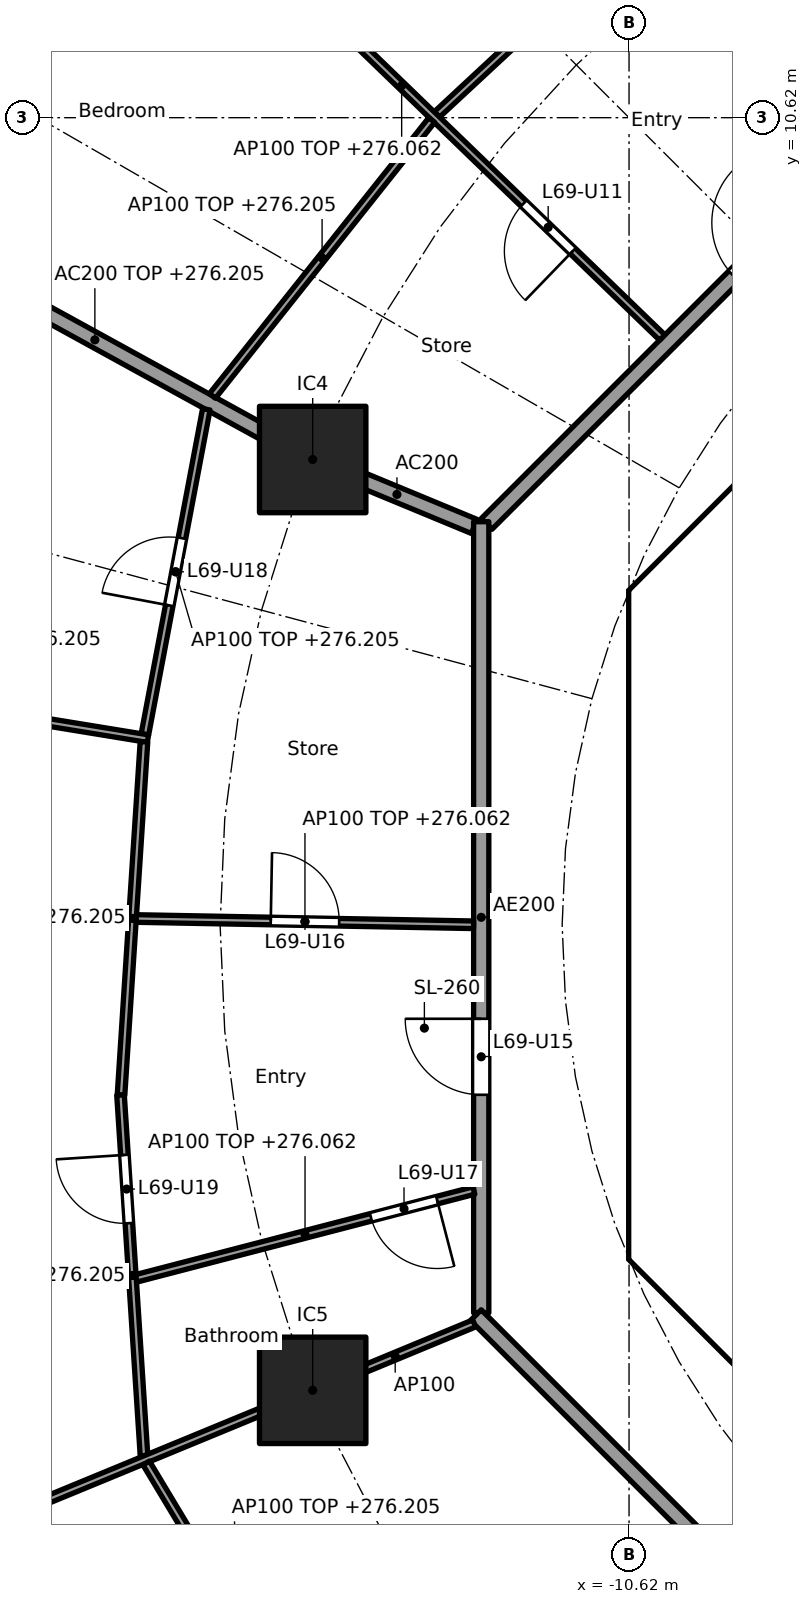
"""IFC4 building model, lengths in metres.
Left out: names, types, materials, properties, quantities, classifications, styles, units other than length and angle.
Written with IfcOpenShell. Run it as: python <this file> out.ifc"""

import sys

from ifc_helpers import new_model, si_unit, direction, frame, frame_2d, origin, origin_2d, place, context, subcontext, project, spatial, polyline, rectangle, outline, extrude, element, fill, save


model = new_model("IFC4")
c1 = context("Model", 3, precision=1e-05, world=origin(), true_north=direction((0.0, 1.0)))
c2 = subcontext(c1, "Body", "Model", "MODEL_VIEW")
j1 = project(units=[si_unit("LENGTHUNIT", "METRE"), si_unit("PLANEANGLEUNIT", "RADIAN")], contexts=[c1])
p1 = place(None, origin())
s1 = spatial("IfcSite", under=j1, at=p1, CompositionType="ELEMENT")
p2 = place(p1, origin())
s2 = spatial("IfcBuilding", under=s1, at=p2, CompositionType="ELEMENT")
p3 = place(p2, frame((0.0, 0.0, 273.3)))
s3 = spatial("IfcBuildingStorey", under=s2, at=p3, CompositionType="ELEMENT", Elevation=273.3)
for number, where, z_axis, x_axis in (
    (1, (-14.782, 6.123, 0.0), (0.0, 0.0, 1.0), (1.0, 0.0, 0.0)),
    (2, (-14.782, -6.123, 0.0), (0.0, 0.0, 1.0), (1.0, 0.0, 0.0)),
):
    element("IfcColumn", number, at=place(p3, frame(where, z_axis=z_axis, x_axis=x_axis)), inside=s3, PredefinedType="COLUMN", context=c2, shape_type="SweptSolid", body=[
        extrude(rectangle(XDim=1.4, YDim=1.4, at=origin_2d()), origin(), (0.0, 0.0, 1.0), 3.7),
    ])
p4 = place(p3, frame((-4.613, 9.988, 0.0), z_axis=(0.0, 0.0, 1.0), x_axis=(-0.707106781187, -0.707106781187, 0.0)))
e3 = element("IfcWall", 3, at=p4, inside=s3, PredefinedType="SHEAR", context=c2, shape_type="SweptSolid", body=[
    extrude(rectangle(XDim=7.602, YDim=0.6, at=frame_2d((3.801, 0.0))), origin(), (0.0, 0.0, 1.0), 3.44),
])
p5 = place(p4, frame((0.351, 0.0, 0.0)))
e4 = element("IfcOpeningElement", 4, at=p5, cuts=e3, PredefinedType="OPENING", context=c2, shape_type="SweptSolid", body=[
    extrude(rectangle(XDim=1.1, YDim=2.1, at=frame_2d((0.55, 1.05))), frame((0.0, 0.31, 0.0), z_axis=(0.0, -1.0, 0.0), x_axis=(1.0, 0.0, 0.0)), (0.0, 0.0, 1.0), 0.62),
])
p6 = place(p3, frame((-10.325, 3.801, 0.0), z_axis=(0.0, 0.0, 1.0), x_axis=(0.0, -1.0, 0.0)))
e5 = element("IfcWall", 5, at=p6, inside=s3, PredefinedType="SHEAR", context=c2, shape_type="SweptSolid", body=[
    extrude(rectangle(XDim=7.602, YDim=0.6, at=frame_2d((3.801, 0.0))), origin(), (0.0, 0.0, 1.0), 3.44),
])
p7 = place(p6, frame((0.651, 0.0, 0.0)))
e6 = element("IfcOpeningElement", 6, at=p7, cuts=e5, PredefinedType="OPENING", context=c2, shape_type="SweptSolid", body=[
    extrude(rectangle(XDim=1.5, YDim=2.1, at=frame_2d((0.75, 1.05))), frame((0.0, 0.31, 0.0), z_axis=(0.0, -1.0, 0.0), x_axis=(1.0, 0.0, 0.0)), (0.0, 0.0, 1.0), 0.62),
])
p8 = place(p6, frame((5.451, 0.0, 0.0)))
e7 = element("IfcOpeningElement", 7, at=p8, cuts=e5, PredefinedType="OPENING", context=c2, shape_type="SweptSolid", body=[
    extrude(rectangle(XDim=1.5, YDim=2.1, at=frame_2d((0.75, 1.05))), frame((0.0, 0.31, 0.0), z_axis=(0.0, -1.0, 0.0), x_axis=(1.0, 0.0, 0.0)), (0.0, 0.0, 1.0), 0.62),
])
p9 = place(p3, frame((-9.988, -4.613, 0.0), z_axis=(0.0, 0.0, 1.0), x_axis=(0.707106781187, -0.707106781187, 0.0)))
e8 = element("IfcWall", 8, at=p9, inside=s3, PredefinedType="SHEAR", context=c2, shape_type="SweptSolid", body=[
    extrude(rectangle(XDim=7.602, YDim=0.6, at=frame_2d((3.801, 0.0))), origin(), (0.0, 0.0, 1.0), 3.44),
])
p10 = place(p9, frame((6.151, 0.0, 0.0)))
e9 = element("IfcOpeningElement", 9, at=p10, cuts=e8, PredefinedType="OPENING", context=c2, shape_type="SweptSolid", body=[
    extrude(rectangle(XDim=1.1, YDim=2.1, at=frame_2d((0.55, 1.05))), frame((0.0, 0.31, 0.0), z_axis=(0.0, -1.0, 0.0), x_axis=(1.0, 0.0, 0.0)), (0.0, 0.0, 1.0), 0.62),
])
p11 = place(p3, origin())
e10 = element("IfcWall", 10, at=p11, inside=s3, PredefinedType="SHEAR", context=c2, shape_type="SweptSolid", body=[
    extrude(outline(polyline([(-10.625, -3.801), (-10.025, -3.801), (-10.025, -4.152), (-9.776, -4.401), (-10.2, -4.825), (-10.625, -4.401), (-10.625, -3.801)])), origin(), (0.0, 0.0, 1.0), 3.44),
])
p12 = place(p3, origin())
e11 = element("IfcWall", 11, at=p12, inside=s3, PredefinedType="SHEAR", context=c2, shape_type="SweptSolid", body=[
    extrude(outline(polyline([(-10.2, 4.825), (-9.776, 4.401), (-10.025, 4.152), (-10.025, 3.801), (-10.625, 3.801), (-10.625, 4.401), (-10.2, 4.825)])), origin(), (0.0, 0.0, 1.0), 3.44),
])
for number, where, z_axis, x_axis in (
    (12, (-10.025, -4.0, 0.0), (0.0, 0.0, 1.0), (1.0, 0.0, 0.0)),
    (13, (-10.025, 4.0, 0.0), (0.0, 0.0, 1.0), (1.0, 0.0, 0.0)),
):
    element("IfcWall", number, at=place(p3, frame(where, z_axis=z_axis, x_axis=x_axis)), inside=s3, PredefinedType="PARTITIONING", context=c2, shape_type="SweptSolid", body=[
        extrude(rectangle(XDim=3.325, YDim=0.2, at=frame_2d((1.662, 0.0))), origin(), (0.0, 0.0, 1.0), 3.44),
    ])
p13 = place(p3, frame((-12.657, 5.243, 0.0), z_axis=(0.0, 0.0, 1.0), x_axis=(-0.923869415315, 0.382707856524, 0.0)))
e14 = element("IfcWall", 14, at=p13, inside=s3, PredefinedType="PARTITIONING", context=c2, shape_type="SweptSolid", body=[
    extrude(rectangle(XDim=2.2, YDim=0.2, at=frame_2d((1.1, 0.0))), origin(), (0.0, 0.0, 1.0), 3.44),
])
p14 = place(p3, frame((-14.826, 6.147, 0.0), z_axis=(0.0, 0.0, 1.0), x_axis=(-0.876484755865, 0.481429613481, 0.0)))
e15 = element("IfcWall", 15, at=p14, inside=s3, PredefinedType="PARTITIONING", context=c2, shape_type="SweptSolid", body=[
    extrude(rectangle(XDim=6.439, YDim=0.2, at=frame_2d((3.219, 0.0))), origin(), (0.0, 0.0, 1.0), 2.905),
])
p15 = place(p3, frame((-5.275, 12.494, 0.0), z_axis=(0.0, 0.0, 1.0), x_axis=(-0.707106781187, -0.707106781187, 0.0)))
e16 = element("IfcWall", 16, at=p15, inside=s3, PredefinedType="PARTITIONING", context=c2, shape_type="SweptSolid", body=[
    extrude(rectangle(XDim=10.209, YDim=0.2, at=frame_2d((5.104, 0.0))), origin(), (0.0, 0.0, 1.0), 3.44),
])
p16 = place(p15, frame((4.604, 0.0, 0.0)))
e17 = element("IfcOpeningElement", 17, at=p16, cuts=e16, PredefinedType="OPENING", context=c2, shape_type="SweptSolid", body=[
    extrude(rectangle(XDim=1.0, YDim=2.1, at=frame_2d((0.5, 1.05))), frame((0.0, 0.11, 0.0), z_axis=(0.0, -1.0, 0.0), x_axis=(1.0, 0.0, 0.0)), (0.0, 0.0, 1.0), 0.22),
])
p17 = place(p3, frame((-12.565, 5.304, 0.0), z_axis=(0.0, 0.0, 1.0), x_axis=(0.0, -1.0, 0.0)))
e18 = element("IfcWall", 18, at=p17, inside=s3, PredefinedType="PARTITIONING", context=c2, shape_type="SweptSolid", body=[
    extrude(rectangle(XDim=10.409, YDim=0.2, at=frame_2d((5.205, 0.0))), origin(), (0.0, 0.0, 1.0), 3.44),
])
p18 = place(p17, frame((6.539, 0.0, 0.0)))
e19 = element("IfcOpeningElement", 19, at=p18, cuts=e18, PredefinedType="OPENING", context=c2, shape_type="SweptSolid", body=[
    extrude(rectangle(XDim=1.0, YDim=2.1, at=frame_2d((0.5, 1.05))), frame((0.0, 0.11, 0.0), z_axis=(0.0, -1.0, 0.0), x_axis=(1.0, 0.0, 0.0)), (0.0, 0.0, 1.0), 0.22),
])
p19 = place(p3, frame((-12.635, -5.134, 0.0), z_axis=(0.0, 0.0, 1.0), x_axis=(0.707106781187, -0.707106781187, 0.0)))
e20 = element("IfcWall", 20, at=p19, inside=s3, PredefinedType="PARTITIONING", context=c2, shape_type="SweptSolid", body=[
    extrude(rectangle(XDim=10.609, YDim=0.2, at=frame_2d((5.305, 0.0))), origin(), (0.0, 0.0, 1.0), 3.44),
])
p20 = place(p3, frame((-7.709, 10.197, 0.0), z_axis=(0.0, 0.0, 1.0), x_axis=(-0.515516160663, 0.856879856278, 0.0)))
e21 = element("IfcWall", 21, at=p20, inside=s3, PredefinedType="PARTITIONING", context=c2, shape_type="SweptSolid", body=[
    extrude(rectangle(XDim=9.426, YDim=0.1, at=frame_2d((4.713, 0.0))), origin(), (0.0, 0.0, 1.0), 2.762),
])
p21 = place(p20, frame((1.615, 0.0, 0.0)))
e22 = element("IfcOpeningElement", 22, at=p21, cuts=e21, PredefinedType="OPENING", context=c2, shape_type="SweptSolid", body=[
    extrude(rectangle(XDim=0.9, YDim=2.1, at=frame_2d((0.45, 1.05))), frame((0.0, 0.06, 0.0), z_axis=(0.0, -1.0, 0.0), x_axis=(1.0, 0.0, 0.0)), (0.0, 0.0, 1.0), 0.12),
])
p22 = place(p20, frame((6.328, 0.0, 0.0)))
e23 = element("IfcOpeningElement", 23, at=p22, cuts=e21, PredefinedType="OPENING", context=c2, shape_type="SweptSolid", body=[
    extrude(rectangle(XDim=0.9, YDim=2.1, at=frame_2d((0.45, 1.05))), frame((0.0, 0.06, 0.0), z_axis=(0.0, -1.0, 0.0), x_axis=(1.0, 0.0, 0.0)), (0.0, 0.0, 1.0), 0.12),
])
p23 = place(p3, frame((-9.875, 13.702, 0.0), z_axis=(0.0, 0.0, 1.0), x_axis=(-0.732618266441, -0.680639754699, 0.0)))
e24 = element("IfcWall", 24, at=p23, inside=s3, PredefinedType="PARTITIONING", context=c2, shape_type="SweptSolid", body=[
    extrude(rectangle(XDim=4.467, YDim=0.1, at=frame_2d((2.233, 0.0))), origin(), (0.0, 0.0, 1.0), 2.905),
])
p24 = place(p23, frame((1.783, 0.0, 0.0)))
e25 = element("IfcOpeningElement", 25, at=p24, cuts=e24, PredefinedType="OPENING", context=c2, shape_type="SweptSolid", body=[
    extrude(rectangle(XDim=0.9, YDim=2.1, at=frame_2d((0.45, 1.05))), frame((0.0, 0.06, 0.0), z_axis=(0.0, -1.0, 0.0), x_axis=(1.0, 0.0, 0.0)), (0.0, 0.0, 1.0), 0.12),
])
p25 = place(p3, frame((-10.183, 7.727, 0.0), z_axis=(0.0, 0.0, 1.0), x_axis=(-0.719063433856, 0.694944442449, 0.0)))
e26 = element("IfcWall", 26, at=p25, inside=s3, PredefinedType="PARTITIONING", context=c2, shape_type="SweptSolid", body=[
    extrude(rectangle(XDim=9.535, YDim=0.1, at=frame_2d((4.768, 0.0))), origin(), (0.0, 0.0, 1.0), 2.762),
])
p26 = place(p25, frame((1.637, 0.0, 0.0)))
e27 = element("IfcOpeningElement", 27, at=p26, cuts=e26, PredefinedType="OPENING", context=c2, shape_type="SweptSolid", body=[
    extrude(rectangle(XDim=0.9, YDim=2.1, at=frame_2d((0.45, 1.05))), frame((0.0, 0.06, 0.0), z_axis=(0.0, -1.0, 0.0), x_axis=(1.0, 0.0, 0.0)), (0.0, 0.0, 1.0), 0.12),
])
p27 = place(p25, frame((6.405, 0.0, 0.0)))
e28 = element("IfcOpeningElement", 28, at=p27, cuts=e26, PredefinedType="OPENING", context=c2, shape_type="SweptSolid", body=[
    extrude(rectangle(XDim=0.9, YDim=2.1, at=frame_2d((0.45, 1.05))), frame((0.0, 0.06, 0.0), z_axis=(0.0, -1.0, 0.0), x_axis=(1.0, 0.0, 0.0)), (0.0, 0.0, 1.0), 0.12),
])
p28 = place(p3, frame((-13.216, 10.589, 0.0), z_axis=(0.0, 0.0, 1.0), x_axis=(-0.622251572882, -0.782817335045, 0.0)))
e29 = element("IfcWall", 29, at=p28, inside=s3, PredefinedType="PARTITIONING", context=c2, shape_type="SweptSolid", body=[
    extrude(rectangle(XDim=4.636, YDim=0.1, at=frame_2d((2.318, 0.0))), origin(), (0.0, 0.0, 1.0), 2.905),
])
p29 = place(p3, frame((-16.181, 6.783, 0.0), z_axis=(0.0, 0.0, 1.0), x_axis=(-0.185670583745, -0.982612046706, 0.0)))
e30 = element("IfcWall", 30, at=p29, inside=s3, PredefinedType="PARTITIONING", context=c2, shape_type="SweptSolid", body=[
    extrude(rectangle(XDim=4.351, YDim=0.1, at=frame_2d((2.176, 0.0))), origin(), (0.0, 0.0, 1.0), 2.905),
])
p30 = place(p29, frame((1.726, 0.0, 0.0)))
e31 = element("IfcOpeningElement", 31, at=p30, cuts=e30, PredefinedType="OPENING", context=c2, shape_type="SweptSolid", body=[
    extrude(rectangle(XDim=0.9, YDim=2.1, at=frame_2d((0.45, 1.05))), frame((0.0, 0.06, 0.0), z_axis=(0.0, -1.0, 0.0), x_axis=(1.0, 0.0, 0.0)), (0.0, 0.0, 1.0), 0.12),
])
p31 = place(p3, frame((-16.949, 2.451, 0.0), z_axis=(0.0, 0.0, 1.0), x_axis=(-0.986937570833, 0.161103169673, 0.0)))
e32 = element("IfcWall", 32, at=p31, inside=s3, PredefinedType="PARTITIONING", context=c2, shape_type="SweptSolid", body=[
    extrude(rectangle(XDim=5.743, YDim=0.1, at=frame_2d((2.872, 0.0))), origin(), (0.0, 0.0, 1.0), 2.905),
])
p32 = place(p3, frame((-17.002, 2.409, 0.0), z_axis=(0.0, 0.0, 1.0), x_axis=(-0.064855550758, -0.997894662545, 0.0)))
e33 = element("IfcWall", 33, at=p32, inside=s3, PredefinedType="PARTITIONING", context=c2, shape_type="SweptSolid", body=[
    extrude(rectangle(XDim=4.656, YDim=0.1, at=frame_2d((2.328, 0.0))), origin(), (0.0, 0.0, 1.0), 2.905),
])
p33 = place(p3, frame((-12.665, 0.002, 0.0), z_axis=(0.0, 0.0, 1.0), x_axis=(-0.999827178165, 0.018590691287, 0.0)))
e34 = element("IfcWall", 34, at=p33, inside=s3, PredefinedType="PARTITIONING", context=c2, shape_type="SweptSolid", body=[
    extrude(rectangle(XDim=4.439, YDim=0.1, at=frame_2d((2.219, 0.0))), origin(), (0.0, 0.0, 1.0), 2.762),
])
p34 = place(p33, frame((1.769, 0.0, 0.0)))
e35 = element("IfcOpeningElement", 35, at=p34, cuts=e34, PredefinedType="OPENING", context=c2, shape_type="SweptSolid", body=[
    extrude(rectangle(XDim=0.9, YDim=2.1, at=frame_2d((0.45, 1.05))), frame((0.0, 0.06, 0.0), z_axis=(0.0, -1.0, 0.0), x_axis=(1.0, 0.0, 0.0)), (0.0, 0.0, 1.0), 0.12),
])
p35 = place(p3, frame((-17.31, -2.238, 0.0), z_axis=(0.0, 0.0, 1.0), x_axis=(0.064949202176, -0.997888571503, 0.0)))
e36 = element("IfcWall", 36, at=p35, inside=s3, PredefinedType="PARTITIONING", context=c2, shape_type="SweptSolid", body=[
    extrude(rectangle(XDim=4.759, YDim=0.1, at=frame_2d((2.379, 0.0))), origin(), (0.0, 0.0, 1.0), 2.905),
])
p36 = place(p35, frame((0.79, 0.0, 0.0)))
e37 = element("IfcOpeningElement", 37, at=p36, cuts=e36, PredefinedType="OPENING", context=c2, shape_type="SweptSolid", body=[
    extrude(rectangle(XDim=0.9, YDim=2.1, at=frame_2d((0.45, 1.05))), frame((0.0, 0.06, 0.0), z_axis=(0.0, -1.0, 0.0), x_axis=(1.0, 0.0, 0.0)), (0.0, 0.0, 1.0), 0.12),
])
p37 = place(p3, frame((-12.662, -3.495, 0.0), z_axis=(0.0, 0.0, 1.0), x_axis=(-0.967834941053, -0.251586022817, 0.0)))
e38 = element("IfcWall", 38, at=p37, inside=s3, PredefinedType="PARTITIONING", context=c2, shape_type="SweptSolid", body=[
    extrude(rectangle(XDim=4.59, YDim=0.1, at=frame_2d((2.295, 0.0))), origin(), (0.0, 0.0, 1.0), 2.762),
])
p38 = place(p37, frame((0.5, 0.0, 0.0)))
e39 = element("IfcOpeningElement", 39, at=p38, cuts=e38, PredefinedType="OPENING", context=c2, shape_type="SweptSolid", body=[
    extrude(rectangle(XDim=0.9, YDim=2.1, at=frame_2d((0.45, 1.05))), frame((0.0, 0.06, 0.0), z_axis=(0.0, -1.0, 0.0), x_axis=(1.0, 0.0, 0.0)), (0.0, 0.0, 1.0), 0.12),
])
p39 = place(p3, frame((-12.657, -5.243, 0.0), z_axis=(0.0, 0.0, 1.0), x_axis=(-0.923871314276, -0.382703272338, 0.0)))
e40 = element("IfcWall", 40, at=p39, inside=s3, PredefinedType="PARTITIONING", context=c2, shape_type="SweptSolid", body=[
    extrude(rectangle(XDim=2.249, YDim=0.1, at=frame_2d((1.125, 0.0))), origin(), (0.0, 0.0, 1.0), 3.44),
])
p40 = place(p3, frame((-14.828, -6.142, 0.0), z_axis=(0.0, 0.0, 1.0), x_axis=(-0.924478087429, -0.381235184451, 0.0)))
e41 = element("IfcWall", 41, at=p40, inside=s3, PredefinedType="PARTITIONING", context=c2, shape_type="SweptSolid", body=[
    extrude(rectangle(XDim=8.499, YDim=0.1, at=frame_2d((4.25, 0.0))), origin(), (0.0, 0.0, 1.0), 2.905),
])
p41 = place(p40, frame((4.973, 0.0, 0.0)))
e42 = element("IfcOpeningElement", 42, at=p41, cuts=e41, PredefinedType="OPENING", context=c2, shape_type="SweptSolid", body=[
    extrude(rectangle(XDim=0.9, YDim=2.1, at=frame_2d((0.45, 1.05))), frame((0.0, 0.06, 0.0), z_axis=(0.0, -1.0, 0.0), x_axis=(1.0, 0.0, 0.0)), (0.0, 0.0, 1.0), 0.12),
])
p42 = place(p3, frame((-16.972, -7.08, 0.0), z_axis=(0.0, 0.0, 1.0), x_axis=(0.514989049311, -0.857196756346, 0.0)))
e43 = element("IfcWall", 43, at=p42, inside=s3, PredefinedType="PARTITIONING", context=c2, shape_type="SweptSolid", body=[
    extrude(rectangle(XDim=4.512, YDim=0.1, at=frame_2d((2.256, 0.0))), origin(), (0.0, 0.0, 1.0), 2.905),
])
p43 = place(p42, frame((1.806, 0.0, 0.0)))
e44 = element("IfcOpeningElement", 44, at=p43, cuts=e43, PredefinedType="OPENING", context=c2, shape_type="SweptSolid", body=[
    extrude(rectangle(XDim=0.9, YDim=2.1, at=frame_2d((0.45, 1.05))), frame((0.0, 0.06, 0.0), z_axis=(0.0, -1.0, 0.0), x_axis=(1.0, 0.0, 0.0)), (0.0, 0.0, 1.0), 0.12),
])
p44 = place(p7, origin())
e45 = element("IfcDoor", 45, at=p44, inside=s3, OperationType="DOUBLE_DOOR_SINGLE_SWING", PredefinedType="DOOR", context=c2, shape_type="SweptSolid", body=[
    extrude(rectangle(XDim=1.5, YDim=2.1, at=frame_2d((0.75, 1.05))), frame((0.0, 0.025, 0.0), z_axis=(0.0, -1.0, 0.0), x_axis=(1.0, 0.0, 0.0)), (0.0, 0.0, 1.0), 0.05),
])
fill(e6, e45)
p45 = place(p8, origin())
e46 = element("IfcDoor", 46, at=p45, inside=s3, OperationType="DOUBLE_DOOR_SINGLE_SWING", PredefinedType="DOOR", context=c2, shape_type="SweptSolid", body=[
    extrude(rectangle(XDim=1.5, YDim=2.1, at=frame_2d((0.75, 1.05))), frame((0.0, 0.025, 0.0), z_axis=(0.0, -1.0, 0.0), x_axis=(1.0, 0.0, 0.0)), (0.0, 0.0, 1.0), 0.05),
])
fill(e7, e46)
p46 = place(p16, frame((1.0, 0.0, 0.0), x_axis=(-1.0, 0.0, 0.0)))
e47 = element("IfcDoor", 47, at=p46, inside=s3, OperationType="SINGLE_SWING_RIGHT", PredefinedType="DOOR", context=c2, shape_type="SweptSolid", body=[
    extrude(rectangle(XDim=1.0, YDim=2.1, at=frame_2d((0.5, 1.05))), frame((0.0, 0.025, 0.0), z_axis=(0.0, -1.0, 0.0), x_axis=(1.0, 0.0, 0.0)), (0.0, 0.0, 1.0), 0.05),
])
fill(e17, e47)
p47 = place(p26, origin())
e48 = element("IfcDoor", 48, at=p47, inside=s3, OperationType="SINGLE_SWING_LEFT", PredefinedType="DOOR", context=c2, shape_type="SweptSolid", body=[
    extrude(rectangle(XDim=0.9, YDim=2.1, at=frame_2d((0.45, 1.05))), frame((0.0, 0.025, 0.0), z_axis=(0.0, -1.0, 0.0), x_axis=(1.0, 0.0, 0.0)), (0.0, 0.0, 1.0), 0.05),
])
fill(e27, e48)
p48 = place(p18, frame((1.0, 0.0, 0.0), x_axis=(-1.0, 0.0, 0.0)))
e49 = element("IfcDoor", 49, at=p48, inside=s3, OperationType="SINGLE_SWING_RIGHT", PredefinedType="DOOR", context=c2, shape_type="SweptSolid", body=[
    extrude(rectangle(XDim=1.0, YDim=2.1, at=frame_2d((0.5, 1.05))), frame((0.0, 0.025, 0.0), z_axis=(0.0, -1.0, 0.0), x_axis=(1.0, 0.0, 0.0)), (0.0, 0.0, 1.0), 0.05),
])
fill(e19, e49)
p49 = place(p34, frame((0.9, 0.0, 0.0), x_axis=(-1.0, 0.0, 0.0)))
e50 = element("IfcDoor", 50, at=p49, inside=s3, OperationType="SINGLE_SWING_LEFT", PredefinedType="DOOR", context=c2, shape_type="SweptSolid", body=[
    extrude(rectangle(XDim=0.9, YDim=2.1, at=frame_2d((0.45, 1.05))), frame((0.0, 0.025, 0.0), z_axis=(0.0, -1.0, 0.0), x_axis=(1.0, 0.0, 0.0)), (0.0, 0.0, 1.0), 0.05),
])
fill(e35, e50)
p50 = place(p38, origin())
e51 = element("IfcDoor", 51, at=p50, inside=s3, OperationType="SINGLE_SWING_LEFT", PredefinedType="DOOR", context=c2, shape_type="SweptSolid", body=[
    extrude(rectangle(XDim=0.9, YDim=2.1, at=frame_2d((0.45, 1.05))), frame((0.0, 0.025, 0.0), z_axis=(0.0, -1.0, 0.0), x_axis=(1.0, 0.0, 0.0)), (0.0, 0.0, 1.0), 0.05),
])
fill(e39, e51)
p51 = place(p30, frame((0.9, 0.0, 0.0), x_axis=(-1.0, 0.0, 0.0)))
e52 = element("IfcDoor", 52, at=p51, inside=s3, OperationType="SINGLE_SWING_LEFT", PredefinedType="DOOR", context=c2, shape_type="SweptSolid", body=[
    extrude(rectangle(XDim=0.9, YDim=2.1, at=frame_2d((0.45, 1.05))), frame((0.0, 0.025, 0.0), z_axis=(0.0, -1.0, 0.0), x_axis=(1.0, 0.0, 0.0)), (0.0, 0.0, 1.0), 0.05),
])
fill(e31, e52)
p52 = place(p36, frame((0.9, 0.0, 0.0), x_axis=(-1.0, 0.0, 0.0)))
e53 = element("IfcDoor", 53, at=p52, inside=s3, OperationType="SINGLE_SWING_RIGHT", PredefinedType="DOOR", context=c2, shape_type="SweptSolid", body=[
    extrude(rectangle(XDim=0.9, YDim=2.1, at=frame_2d((0.45, 1.05))), frame((0.0, 0.025, 0.0), z_axis=(0.0, -1.0, 0.0), x_axis=(1.0, 0.0, 0.0)), (0.0, 0.0, 1.0), 0.05),
])
fill(e37, e53)
save(model, sys.argv[1])
